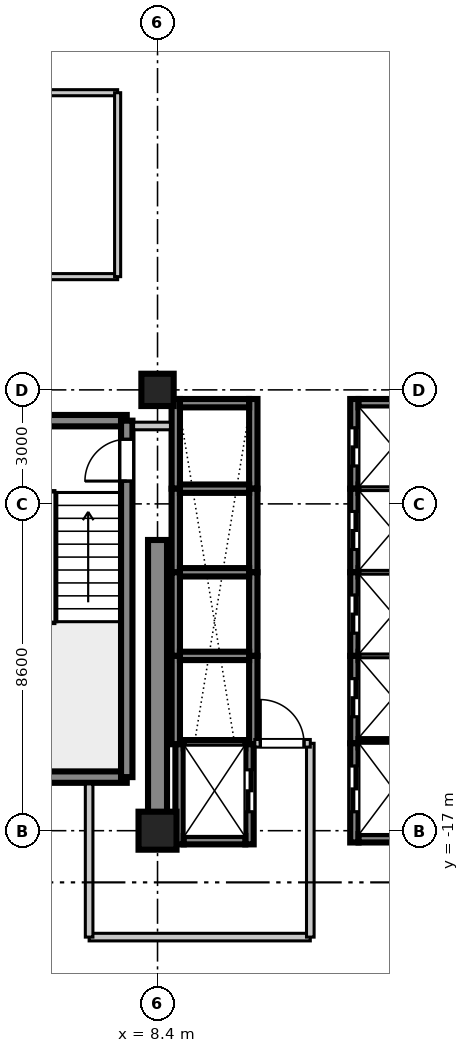
"""IFC4 building model, lengths in metres.
Left out: names, types, materials, properties, quantities, classifications, styles, units other than length and angle.
Written with IfcOpenShell. Run it as: python <this file> out.ifc"""

import sys

from ifc_helpers import new_model, si_unit, direction, frame, frame_2d, origin, origin_2d, place, context, subcontext, project, spatial, rectangle, extrude, source, transform, mapped, element, fill, save


model = new_model("IFC4")
c1 = context("Model", 3, precision=1e-05, world=origin(), true_north=direction((0.0, 1.0)))
c2 = subcontext(c1, "Body", "Model", "MODEL_VIEW")
j1 = project(units=[si_unit("LENGTHUNIT", "METRE"), si_unit("PLANEANGLEUNIT", "RADIAN")], contexts=[c1])
p1 = place(None, origin())
s1 = spatial("IfcSite", under=j1, at=p1, CompositionType="ELEMENT")
p2 = place(p1, origin())
s2 = spatial("IfcBuilding", under=s1, at=p2, CompositionType="ELEMENT")
p3 = place(p2, frame((0.0, 0.0, 234.5)))
s3 = spatial("IfcBuildingStorey", under=s2, at=p3, CompositionType="ELEMENT", Elevation=234.5)
m1 = source(origin(), c2, "Body", "SweptSolid", [
    extrude(rectangle(XDim=1.0, YDim=1.0, at=origin_2d()), origin(), (0.0, 0.0, 1.0), 3.655),
])
p4 = place(p3, frame((8.4, -17.0, 0.0), z_axis=(0.0, 0.0, 1.0), x_axis=(1.0, 0.0, 0.0)))
e1 = element("IfcColumn", 1, at=p4, inside=s3, PredefinedType="COLUMN", context=c2, shape_type="MappedRepresentation", body=[
    mapped(m1, transform((0.0, 0.0, 0.0), scale=1.0)),
])
m2 = source(origin(), c2, "Body", "SweptSolid", [
    extrude(rectangle(XDim=0.85, YDim=0.85, at=origin_2d()), origin(), (0.0, 0.0, 1.0), 3.655),
])
p5 = place(p3, frame((8.4, -5.4, 0.0), z_axis=(0.0, 0.0, 1.0), x_axis=(1.0, 0.0, 0.0)))
e2 = element("IfcColumn", 2, at=p5, inside=s3, PredefinedType="PILASTER", context=c2, shape_type="MappedRepresentation", body=[
    mapped(m2, transform((0.0, 0.0, 0.0), scale=1.0)),
])
m3 = source(origin(), c2, "Body", "SweptSolid", [
    extrude(rectangle(XDim=7.65, YDim=0.5, at=frame_2d((3.825, 0.0))), origin(), (0.0, 0.0, 1.0), 3.41),
])
p6 = place(p3, frame((8.4, -17.0, 0.0), z_axis=(0.0, 0.0, 1.0), x_axis=(0.0, 1.0, 0.0)))
e3 = element("IfcWall", 3, at=p6, inside=s3, PredefinedType="SHEAR", context=c2, shape_type="MappedRepresentation", body=[
    mapped(m3, transform((0.0, 0.0, 0.0), scale=1.0)),
])
m4 = source(origin(), c2, "Body", "SweptSolid", [
    extrude(rectangle(XDim=3.98, YDim=0.3, at=frame_2d((1.99, 0.0))), origin(), (0.0, 0.0, 1.0), 3.41),
])
for number, where, z_axis, x_axis in (
    (4, (3.61, -15.59, 0.0), (0.0, 0.0, 1.0), (1.0, 0.0, 0.0)),
    (5, (3.61, -6.21, 0.0), (0.0, 0.0, 1.0), (1.0, 0.0, 0.0)),
):
    element("IfcWall", number, at=place(p3, frame(where, z_axis=z_axis, x_axis=x_axis)), inside=s3, PredefinedType="SHEAR", context=c2, shape_type="MappedRepresentation", body=[
        mapped(m4, transform((0.0, 0.0, 0.0), scale=1.0)),
    ])
m5 = source(origin(), c2, "Body", "SweptSolid", [
    extrude(rectangle(XDim=9.38, YDim=0.3, at=frame_2d((4.69, 0.0))), origin(), (0.0, 0.0, 1.0), 3.41),
])
p7 = place(p3, frame((7.59, -15.59, 0.0), z_axis=(0.0, 0.0, 1.0), x_axis=(0.0, 1.0, 0.0)))
e6 = element("IfcWall", 6, at=p7, inside=s3, PredefinedType="SHEAR", context=c2, shape_type="MappedRepresentation", body=[
    mapped(m5, transform((0.0, 0.0, 0.0), scale=1.0)),
])
p8 = place(p7, frame((7.79, 0.0, 0.0)))
e7 = element("IfcOpeningElement", 7, at=p8, cuts=e6, PredefinedType="OPENING", context=c2, shape_type="SweptSolid", body=[
    extrude(rectangle(XDim=1.1, YDim=2.15, at=frame_2d((0.55, 1.075))), frame((0.0, 0.16, 0.0), z_axis=(0.0, -1.0, 0.0), x_axis=(1.0, 0.0, 0.0)), (0.0, 0.0, 1.0), 0.32),
])
m6 = source(origin(), c2, "Body", "SweptSolid", [
    extrude(rectangle(XDim=2.36, YDim=0.22, at=frame_2d((1.18, 0.0))), origin(), (0.0, 0.0, 1.0), 3.41),
])
p9 = place(p3, frame((13.58, -8.0, 0.0), z_axis=(0.0, 0.0, 1.0), x_axis=(0.0, 1.0, 0.0)))
e8 = element("IfcWall", 8, at=p9, inside=s3, PredefinedType="SHEAR", context=c2, shape_type="MappedRepresentation", body=[
    mapped(m6, transform((0.0, 0.0, 0.0), scale=1.0)),
])
p10 = place(p9, frame((0.6, 0.0, 0.0)))
e9 = element("IfcOpeningElement", 9, at=p10, cuts=e8, PredefinedType="OPENING", context=c2, shape_type="SweptSolid", body=[
    extrude(rectangle(XDim=1.0, YDim=2.2, at=frame_2d((0.5, 1.1))), frame((0.0, 0.12, 0.0), z_axis=(0.0, -1.0, 0.0), x_axis=(1.0, 0.0, 0.0)), (0.0, 0.0, 1.0), 0.24),
])
m7 = source(origin(), c2, "Body", "SweptSolid", [
    extrude(rectangle(XDim=1.82, YDim=0.22, at=frame_2d((0.91, 0.0))), origin(), (0.0, 0.0, 1.0), 3.41),
])
p11 = place(p3, frame((13.69, -5.75, 0.0), z_axis=(0.0, 0.0, 1.0), x_axis=(1.0, 0.0, 0.0)))
e10 = element("IfcWall", 10, at=p11, inside=s3, PredefinedType="SHEAR", context=c2, shape_type="MappedRepresentation", body=[
    mapped(m7, transform((0.0, 0.0, 0.0), scale=1.0)),
])
m8 = source(origin(), c2, "Body", "SweptSolid", [
    extrude(rectangle(XDim=2.2, YDim=0.22, at=frame_2d((1.1, 0.0))), origin(), (0.0, 0.0, 1.0), 3.41),
])
p12 = place(p3, frame((13.58, -10.2, 0.0), z_axis=(0.0, 0.0, 1.0), x_axis=(0.0, 1.0, 0.0)))
e11 = element("IfcWall", 11, at=p12, inside=s3, PredefinedType="SHEAR", context=c2, shape_type="MappedRepresentation", body=[
    mapped(m8, transform((0.0, 0.0, 0.0), scale=1.0)),
])
p13 = place(p12, frame((0.6, 0.0, 0.0)))
e12 = element("IfcOpeningElement", 12, at=p13, cuts=e11, PredefinedType="OPENING", context=c2, shape_type="SweptSolid", body=[
    extrude(rectangle(XDim=1.0, YDim=2.2, at=frame_2d((0.5, 1.1))), frame((0.0, 0.12, 0.0), z_axis=(0.0, -1.0, 0.0), x_axis=(1.0, 0.0, 0.0)), (0.0, 0.0, 1.0), 0.24),
])
m9 = source(origin(), c2, "Body", "SweptSolid", [
    extrude(rectangle(XDim=1.82, YDim=0.22, at=frame_2d((0.91, 0.0))), origin(), (0.0, 0.0, 1.0), 3.7),
])
p14 = place(p3, frame((13.69, -8.0, 0.0), z_axis=(0.0, 0.0, 1.0), x_axis=(1.0, 0.0, 0.0)))
e13 = element("IfcWall", 13, at=p14, inside=s3, PredefinedType="SHEAR", context=c2, shape_type="MappedRepresentation", body=[
    mapped(m9, transform((0.0, 0.0, 0.0), scale=1.0)),
])
p15 = place(p3, frame((13.58, -12.4, 0.0), z_axis=(0.0, 0.0, 1.0), x_axis=(0.0, 1.0, 0.0)))
e14 = element("IfcWall", 14, at=p15, inside=s3, PredefinedType="SHEAR", context=c2, shape_type="MappedRepresentation", body=[
    mapped(m8, transform((0.0, 0.0, 0.0), scale=1.0)),
])
p16 = place(p15, frame((0.6, 0.0, 0.0)))
e15 = element("IfcOpeningElement", 15, at=p16, cuts=e14, PredefinedType="OPENING", context=c2, shape_type="SweptSolid", body=[
    extrude(rectangle(XDim=1.0, YDim=2.2, at=frame_2d((0.5, 1.1))), frame((0.0, 0.12, 0.0), z_axis=(0.0, -1.0, 0.0), x_axis=(1.0, 0.0, 0.0)), (0.0, 0.0, 1.0), 0.24),
])
p17 = place(p3, frame((13.69, -10.2, 0.0), z_axis=(0.0, 0.0, 1.0), x_axis=(1.0, 0.0, 0.0)))
e16 = element("IfcWall", 16, at=p17, inside=s3, PredefinedType="SHEAR", context=c2, shape_type="MappedRepresentation", body=[
    mapped(m9, transform((0.0, 0.0, 0.0), scale=1.0)),
])
m10 = source(origin(), c2, "Body", "SweptSolid", [
    extrude(rectangle(XDim=2.3, YDim=0.22, at=frame_2d((1.15, 0.0))), origin(), (0.0, 0.0, 1.0), 3.41),
])
p18 = place(p3, frame((13.58, -14.7, 0.0), z_axis=(0.0, 0.0, 1.0), x_axis=(0.0, 1.0, 0.0)))
e17 = element("IfcWall", 17, at=p18, inside=s3, PredefinedType="SHEAR", context=c2, shape_type="MappedRepresentation", body=[
    mapped(m10, transform((0.0, 0.0, 0.0), scale=1.0)),
])
p19 = place(p18, frame((0.7, 0.0, 0.0)))
e18 = element("IfcOpeningElement", 18, at=p19, cuts=e17, PredefinedType="OPENING", context=c2, shape_type="SweptSolid", body=[
    extrude(rectangle(XDim=1.0, YDim=2.2, at=frame_2d((0.5, 1.1))), frame((0.0, 0.12, 0.0), z_axis=(0.0, -1.0, 0.0), x_axis=(1.0, 0.0, 0.0)), (0.0, 0.0, 1.0), 0.24),
])
p20 = place(p3, frame((13.69, -12.4, 0.0), z_axis=(0.0, 0.0, 1.0), x_axis=(1.0, 0.0, 0.0)))
e19 = element("IfcWall", 19, at=p20, inside=s3, PredefinedType="SHEAR", context=c2, shape_type="MappedRepresentation", body=[
    mapped(m9, transform((0.0, 0.0, 0.0), scale=1.0)),
])
for number, where, z_axis, x_axis in (
    (20, (8.88, -8.0, 0.0), (0.0, 0.0, 1.0), (0.0, 1.0, 0.0)),
    (21, (10.92, -8.0, 0.0), (0.0, 0.0, 1.0), (0.0, 1.0, 0.0)),
):
    element("IfcWall", number, at=place(p3, frame(where, z_axis=z_axis, x_axis=x_axis)), inside=s3, PredefinedType="SHEAR", context=c2, shape_type="MappedRepresentation", body=[
        mapped(m6, transform((0.0, 0.0, 0.0), scale=1.0)),
    ])
p21 = place(p3, frame((8.99, -5.75, 0.0), z_axis=(0.0, 0.0, 1.0), x_axis=(1.0, 0.0, 0.0)))
e22 = element("IfcWall", 22, at=p21, inside=s3, PredefinedType="SHEAR", context=c2, shape_type="MappedRepresentation", body=[
    mapped(m7, transform((0.0, 0.0, 0.0), scale=1.0)),
])
for number, where, z_axis, x_axis in (
    (23, (8.88, -10.2, 0.0), (0.0, 0.0, 1.0), (0.0, 1.0, 0.0)),
    (24, (10.92, -10.2, 0.0), (0.0, 0.0, 1.0), (0.0, 1.0, 0.0)),
):
    element("IfcWall", number, at=place(p3, frame(where, z_axis=z_axis, x_axis=x_axis)), inside=s3, PredefinedType="SHEAR", context=c2, shape_type="MappedRepresentation", body=[
        mapped(m8, transform((0.0, 0.0, 0.0), scale=1.0)),
    ])
p22 = place(p3, frame((8.99, -8.0, 0.0), z_axis=(0.0, 0.0, 1.0), x_axis=(1.0, 0.0, 0.0)))
e25 = element("IfcWall", 25, at=p22, inside=s3, PredefinedType="SHEAR", context=c2, shape_type="MappedRepresentation", body=[
    mapped(m9, transform((0.0, 0.0, 0.0), scale=1.0)),
])
for number, where, z_axis, x_axis in (
    (26, (8.88, -12.4, 0.0), (0.0, 0.0, 1.0), (0.0, 1.0, 0.0)),
    (27, (10.92, -12.4, 0.0), (0.0, 0.0, 1.0), (0.0, 1.0, 0.0)),
):
    element("IfcWall", number, at=place(p3, frame(where, z_axis=z_axis, x_axis=x_axis)), inside=s3, PredefinedType="SHEAR", context=c2, shape_type="MappedRepresentation", body=[
        mapped(m8, transform((0.0, 0.0, 0.0), scale=1.0)),
    ])
p23 = place(p3, frame((8.99, -10.2, 0.0), z_axis=(0.0, 0.0, 1.0), x_axis=(1.0, 0.0, 0.0)))
e28 = element("IfcWall", 28, at=p23, inside=s3, PredefinedType="SHEAR", context=c2, shape_type="MappedRepresentation", body=[
    mapped(m9, transform((0.0, 0.0, 0.0), scale=1.0)),
])
m11 = source(origin(), c2, "Body", "SweptSolid", [
    extrude(rectangle(XDim=2.325, YDim=0.22, at=frame_2d((1.163, 0.0))), origin(), (0.0, 0.0, 1.0), 3.41),
])
for number, where, z_axis, x_axis in (
    (29, (8.88, -14.725, 0.0), (0.0, 0.0, 1.0), (0.0, 1.0, 0.0)),
    (30, (10.92, -14.725, 0.0), (0.0, 0.0, 1.0), (0.0, 1.0, 0.0)),
):
    element("IfcWall", number, at=place(p3, frame(where, z_axis=z_axis, x_axis=x_axis)), inside=s3, PredefinedType="SHEAR", context=c2, shape_type="MappedRepresentation", body=[
        mapped(m11, transform((0.0, 0.0, 0.0), scale=1.0)),
    ])
p24 = place(p3, frame((8.99, -12.4, 0.0), z_axis=(0.0, 0.0, 1.0), x_axis=(1.0, 0.0, 0.0)))
e31 = element("IfcWall", 31, at=p24, inside=s3, PredefinedType="SHEAR", context=c2, shape_type="MappedRepresentation", body=[
    mapped(m9, transform((0.0, 0.0, 0.0), scale=1.0)),
])
m12 = source(origin(), c2, "Body", "SweptSolid", [
    extrude(rectangle(XDim=2.635, YDim=0.22, at=frame_2d((1.317, 0.0))), origin(), (0.0, 0.0, 1.0), 3.41),
])
p25 = place(p3, frame((8.98, -17.36, 0.0), z_axis=(0.0, 0.0, 1.0), x_axis=(0.0, 1.0, 0.0)))
e32 = element("IfcWall", 32, at=p25, inside=s3, PredefinedType="SHEAR", context=c2, shape_type="MappedRepresentation", body=[
    mapped(m12, transform((0.0, 0.0, 0.0), scale=1.0)),
])
p26 = place(p3, frame((10.82, -17.36, 0.0), z_axis=(0.0, 0.0, 1.0), x_axis=(0.0, 1.0, 0.0)))
e33 = element("IfcWall", 33, at=p26, inside=s3, PredefinedType="SHEAR", context=c2, shape_type="MappedRepresentation", body=[
    mapped(m12, transform((0.0, 0.0, 0.0), scale=1.0)),
])
p27 = place(p26, frame((0.86, 0.0, 0.0)))
e34 = element("IfcOpeningElement", 34, at=p27, cuts=e33, PredefinedType="OPENING", context=c2, shape_type="SweptSolid", body=[
    extrude(rectangle(XDim=1.1, YDim=2.2, at=frame_2d((0.55, 1.1))), frame((0.0, 0.12, 0.0), z_axis=(0.0, -1.0, 0.0), x_axis=(1.0, 0.0, 0.0)), (0.0, 0.0, 1.0), 0.24),
])
m13 = source(origin(), c2, "Body", "SweptSolid", [
    extrude(rectangle(XDim=1.62, YDim=0.22, at=frame_2d((0.81, 0.0))), origin(), (0.0, 0.0, 1.0), 3.41),
])
p28 = place(p3, frame((9.09, -17.25, 0.0), z_axis=(0.0, 0.0, 1.0), x_axis=(1.0, 0.0, 0.0)))
e35 = element("IfcWall", 35, at=p28, inside=s3, PredefinedType="SHEAR", context=c2, shape_type="MappedRepresentation", body=[
    mapped(m13, transform((0.0, 0.0, 0.0), scale=1.0)),
])
m14 = source(origin(), c2, "Body", "SweptSolid", [
    extrude(rectangle(XDim=1.62, YDim=0.22, at=frame_2d((0.81, 0.0))), origin(), (0.0, 0.0, 1.0), 3.7),
])
p29 = place(p3, frame((9.09, -14.725, 0.0), z_axis=(0.0, 0.0, 1.0), x_axis=(1.0, 0.0, 0.0)))
e36 = element("IfcWall", 36, at=p29, inside=s3, PredefinedType="SHEAR", context=c2, shape_type="MappedRepresentation", body=[
    mapped(m14, transform((0.0, 0.0, 0.0), scale=1.0)),
])
m15 = source(origin(), c2, "Body", "SweptSolid", [
    extrude(rectangle(XDim=2.61, YDim=0.22, at=frame_2d((1.305, 0.0))), origin(), (0.0, 0.0, 1.0), 3.41),
])
p30 = place(p3, frame((13.58, -17.31, 0.0), z_axis=(0.0, 0.0, 1.0), x_axis=(0.0, 1.0, 0.0)))
e37 = element("IfcWall", 37, at=p30, inside=s3, PredefinedType="SHEAR", context=c2, shape_type="MappedRepresentation", body=[
    mapped(m15, transform((0.0, 0.0, 0.0), scale=1.0)),
])
p31 = place(p30, frame((0.81, 0.0, 0.0)))
e38 = element("IfcOpeningElement", 38, at=p31, cuts=e37, PredefinedType="OPENING", context=c2, shape_type="SweptSolid", body=[
    extrude(rectangle(XDim=1.2, YDim=2.2, at=frame_2d((0.6, 1.1))), frame((0.0, 0.12, 0.0), z_axis=(0.0, -1.0, 0.0), x_axis=(1.0, 0.0, 0.0)), (0.0, 0.0, 1.0), 0.24),
])
p32 = place(p3, frame((13.69, -17.2, 0.0), z_axis=(0.0, 0.0, 1.0), x_axis=(1.0, 0.0, 0.0)))
e39 = element("IfcWall", 39, at=p32, inside=s3, PredefinedType="SHEAR", context=c2, shape_type="MappedRepresentation", body=[
    mapped(m7, transform((0.0, 0.0, 0.0), scale=1.0)),
])
p33 = place(p3, frame((13.69, -14.7, 0.0), z_axis=(0.0, 0.0, 1.0), x_axis=(1.0, 0.0, 0.0)))
e40 = element("IfcWall", 40, at=p33, inside=s3, PredefinedType="SHEAR", context=c2, shape_type="MappedRepresentation", body=[
    mapped(m9, transform((0.0, 0.0, 0.0), scale=1.0)),
])
m16 = source(origin(), c2, "Body", "SweptSolid", [
    extrude(rectangle(XDim=5.82, YDim=0.2, at=frame_2d((2.91, 0.0))), origin(), (0.0, 0.0, 1.0), 2.75),
])
p34 = place(p3, frame((6.6, -19.8, 0.0), z_axis=(0.0, 0.0, 1.0), x_axis=(1.0, 0.0, 0.0)))
e41 = element("IfcWall", 41, at=p34, inside=s3, PredefinedType="PARTITIONING", context=c2, shape_type="MappedRepresentation", body=[
    mapped(m16, transform((0.0, 0.0, 0.0), scale=1.0)),
])
m17 = source(origin(), c2, "Body", "SweptSolid", [
    extrude(rectangle(XDim=4.03, YDim=0.2, at=frame_2d((2.015, 0.0))), origin(), (0.0, 0.0, 1.0), 2.75),
])
p35 = place(p3, frame((6.6, -19.8, 0.0), z_axis=(0.0, 0.0, 1.0), x_axis=(0.0, 1.0, 0.0)))
e42 = element("IfcWall", 42, at=p35, inside=s3, PredefinedType="PARTITIONING", context=c2, shape_type="MappedRepresentation", body=[
    mapped(m17, transform((0.0, 0.0, 0.0), scale=1.0)),
])
m18 = source(origin(), c2, "Body", "SweptSolid", [
    extrude(rectangle(XDim=5.1, YDim=0.2, at=frame_2d((2.55, 0.0))), origin(), (0.0, 0.0, 1.0), 2.75),
])
p36 = place(p3, frame((12.42, -19.8, 0.0), z_axis=(0.0, 0.0, 1.0), x_axis=(0.0, 1.0, 0.0)))
e43 = element("IfcWall", 43, at=p36, inside=s3, PredefinedType="PARTITIONING", context=c2, shape_type="MappedRepresentation", body=[
    mapped(m18, transform((0.0, 0.0, 0.0), scale=1.0)),
])
m19 = source(origin(), c2, "Body", "SweptSolid", [
    extrude(rectangle(XDim=1.46, YDim=0.2, at=frame_2d((0.73, 0.0))), origin(), (0.0, 0.0, 1.0), 2.75),
])
p37 = place(p3, frame((10.96, -14.7, 0.0), z_axis=(0.0, 0.0, 1.0), x_axis=(1.0, 0.0, 0.0)))
e44 = element("IfcWall", 44, at=p37, inside=s3, PredefinedType="PARTITIONING", context=c2, shape_type="MappedRepresentation", body=[
    mapped(m19, transform((0.0, 0.0, 0.0), scale=1.0)),
])
p38 = place(p37, frame((0.145, 0.0, 0.0)))
e45 = element("IfcOpeningElement", 45, at=p38, cuts=e44, PredefinedType="OPENING", context=c2, shape_type="SweptSolid", body=[
    extrude(rectangle(XDim=1.15, YDim=2.15, at=frame_2d((0.575, 1.075))), frame((0.0, 0.11, 0.0), z_axis=(0.0, -1.0, 0.0), x_axis=(1.0, 0.0, 0.0)), (0.0, 0.0, 1.0), 0.22),
])
m20 = source(origin(), c2, "Body", "SweptSolid", [
    extrude(rectangle(XDim=0.97, YDim=0.2, at=frame_2d((0.485, 0.0))), origin(), (0.0, 0.0, 1.0), 2.75),
])
p39 = place(p3, frame((7.77, -6.35, 0.0), z_axis=(0.0, 0.0, 1.0), x_axis=(1.0, 0.0, 0.0)))
e46 = element("IfcWall", 46, at=p39, inside=s3, PredefinedType="PARTITIONING", context=c2, shape_type="MappedRepresentation", body=[
    mapped(m20, transform((0.0, 0.0, 0.0), scale=1.0)),
])
m21 = source(origin(), c2, "Body", "SweptSolid", [
    extrude(rectangle(XDim=20.4, YDim=0.16, at=frame_2d((10.2, 0.0))), origin(), (0.0, 0.0, 1.0), 2.75),
])
p40 = place(p3, frame((-13.05, -2.42, 0.0), z_axis=(0.0, 0.0, 1.0), x_axis=(1.0, 0.0, 0.0)))
e47 = element("IfcWall", 47, at=p40, inside=s3, PredefinedType="PARTITIONING", context=c2, shape_type="MappedRepresentation", body=[
    mapped(m21, transform((0.0, 0.0, 0.0), scale=1.0)),
])
p41 = place(p3, frame((-13.05, 2.42, 0.0), z_axis=(0.0, 0.0, 1.0), x_axis=(1.0, 0.0, 0.0)))
e48 = element("IfcWall", 48, at=p41, inside=s3, PredefinedType="PARTITIONING", context=c2, shape_type="MappedRepresentation", body=[
    mapped(m21, transform((0.0, 0.0, 0.0), scale=1.0)),
])
p42 = place(p41, frame((0.535, 0.0, 0.0)))
e49 = element("IfcOpeningElement", 49, at=p42, cuts=e48, PredefinedType="OPENING", context=c2, shape_type="SweptSolid", body=[
    extrude(rectangle(XDim=1.5, YDim=2.15, at=frame_2d((0.75, 1.075))), frame((0.0, 0.09, 0.0), z_axis=(0.0, -1.0, 0.0), x_axis=(1.0, 0.0, 0.0)), (0.0, 0.0, 1.0), 0.18),
])
m22 = source(origin(), c2, "Body", "SweptSolid", [
    extrude(rectangle(XDim=4.84, YDim=0.16, at=frame_2d((2.42, 0.0))), origin(), (0.0, 0.0, 1.0), 2.75),
])
p43 = place(p3, frame((7.35, -2.42, 0.0), z_axis=(0.0, 0.0, 1.0), x_axis=(0.0, 1.0, 0.0)))
e50 = element("IfcWall", 50, at=p43, inside=s3, PredefinedType="PARTITIONING", context=c2, shape_type="MappedRepresentation", body=[
    mapped(m22, transform((0.0, 0.0, 0.0), scale=1.0)),
])
m23 = source(origin(), c2, "Body", "SweptSolid", [
    extrude(rectangle(XDim=1.1, YDim=2.15, at=frame_2d((0.55, 1.075))), frame((0.0, 0.025, 0.0), z_axis=(0.0, -1.0, 0.0), x_axis=(1.0, 0.0, 0.0)), (0.0, 0.0, 1.0), 0.05),
])
p44 = place(p8, origin())
e51 = element("IfcDoor", 51, at=p44, inside=s3, OperationType="SINGLE_SWING_LEFT", PredefinedType="DOOR", context=c2, shape_type="MappedRepresentation", body=[
    mapped(m23, transform((0.0, 0.0, 0.0), scale=1.0)),
])
fill(e7, e51)
m24 = source(origin(), c2, "Body", "SweptSolid", [
    extrude(rectangle(XDim=1.0, YDim=2.2, at=frame_2d((0.5, 1.1))), frame((0.0, 0.025, 0.0), z_axis=(0.0, -1.0, 0.0), x_axis=(1.0, 0.0, 0.0)), (0.0, 0.0, 1.0), 0.05),
])
p45 = place(p10, origin())
e52 = element("IfcDoor", 52, at=p45, inside=s3, OperationType="DOUBLE_DOOR_SLIDING", PredefinedType="DOOR", context=c2, shape_type="MappedRepresentation", body=[
    mapped(m24, transform((0.0, 0.0, 0.0), scale=1.0)),
])
fill(e9, e52)
p46 = place(p13, origin())
e53 = element("IfcDoor", 53, at=p46, inside=s3, OperationType="DOUBLE_DOOR_SLIDING", PredefinedType="DOOR", context=c2, shape_type="MappedRepresentation", body=[
    mapped(m24, transform((0.0, 0.0, 0.0), scale=1.0)),
])
fill(e12, e53)
p47 = place(p16, origin())
e54 = element("IfcDoor", 54, at=p47, inside=s3, OperationType="DOUBLE_DOOR_SLIDING", PredefinedType="DOOR", context=c2, shape_type="MappedRepresentation", body=[
    mapped(m24, transform((0.0, 0.0, 0.0), scale=1.0)),
])
fill(e15, e54)
p48 = place(p19, origin())
e55 = element("IfcDoor", 55, at=p48, inside=s3, OperationType="DOUBLE_DOOR_SLIDING", PredefinedType="DOOR", context=c2, shape_type="MappedRepresentation", body=[
    mapped(m24, transform((0.0, 0.0, 0.0), scale=1.0)),
])
fill(e18, e55)
m25 = source(origin(), c2, "Body", "SweptSolid", [
    extrude(rectangle(XDim=1.1, YDim=2.2, at=frame_2d((0.55, 1.1))), frame((0.0, 0.025, 0.0), z_axis=(0.0, -1.0, 0.0), x_axis=(1.0, 0.0, 0.0)), (0.0, 0.0, 1.0), 0.05),
])
p49 = place(p27, frame((1.1, 0.0, 0.0), z_axis=(0.0, 0.0, 1.0), x_axis=(-1.0, 0.0, 0.0)))
e56 = element("IfcDoor", 56, at=p49, inside=s3, OperationType="DOUBLE_DOOR_SLIDING", PredefinedType="DOOR", context=c2, shape_type="MappedRepresentation", body=[
    mapped(m25, transform((0.0, 0.0, 0.0), scale=1.0)),
])
fill(e34, e56)
m26 = source(origin(), c2, "Body", "SweptSolid", [
    extrude(rectangle(XDim=1.2, YDim=2.2, at=frame_2d((0.6, 1.1))), frame((0.0, 0.025, 0.0), z_axis=(0.0, -1.0, 0.0), x_axis=(1.0, 0.0, 0.0)), (0.0, 0.0, 1.0), 0.05),
])
p50 = place(p31, origin())
e57 = element("IfcDoor", 57, at=p50, inside=s3, OperationType="DOUBLE_DOOR_SLIDING", PredefinedType="DOOR", context=c2, shape_type="MappedRepresentation", body=[
    mapped(m26, transform((0.0, 0.0, 0.0), scale=1.0)),
])
fill(e38, e57)
m27 = source(origin(), c2, "Body", "SweptSolid", [
    extrude(rectangle(XDim=1.15, YDim=2.15, at=frame_2d((0.575, 1.075))), frame((0.0, 0.025, 0.0), z_axis=(0.0, -1.0, 0.0), x_axis=(1.0, 0.0, 0.0)), (0.0, 0.0, 1.0), 0.05),
])
p51 = place(p38, origin())
e58 = element("IfcDoor", 58, at=p51, inside=s3, OperationType="SINGLE_SWING_LEFT", PredefinedType="DOOR", context=c2, shape_type="MappedRepresentation", body=[
    mapped(m27, transform((0.0, 0.0, 0.0), scale=1.0)),
])
fill(e45, e58)
save(model, sys.argv[1])
